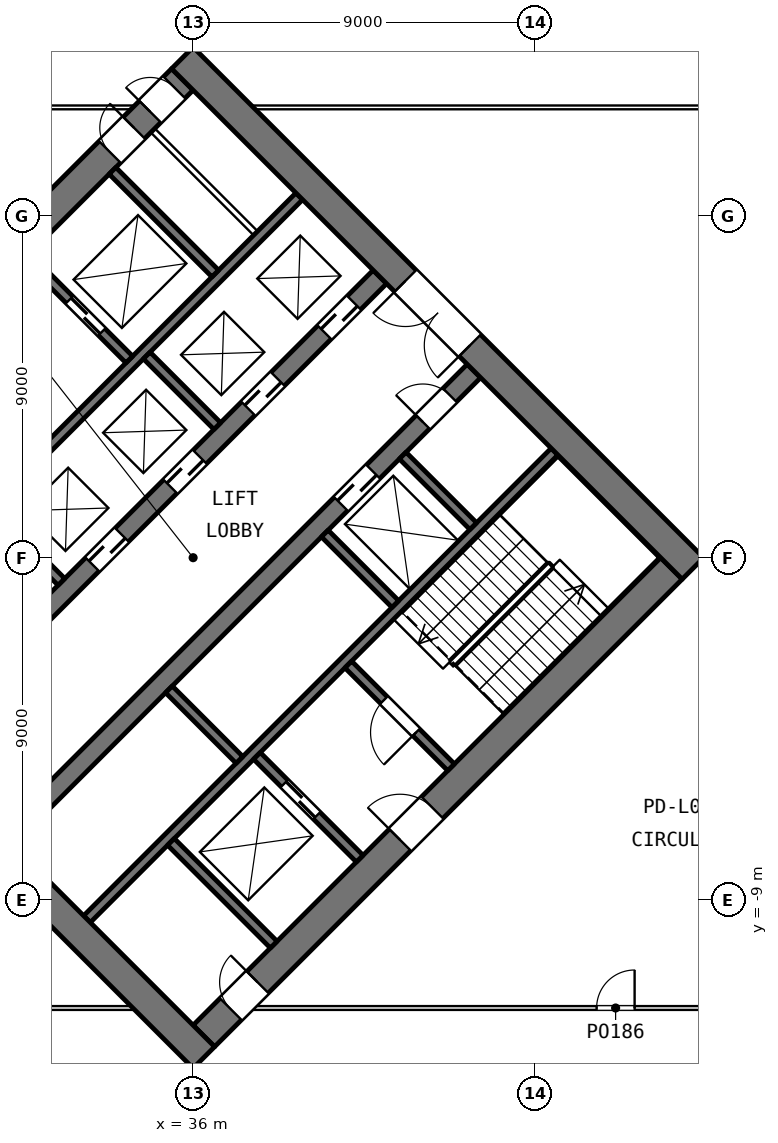
"""IFC4 building model, lengths in metres.
Left out: names, types, materials, properties, quantities, classifications, styles, units other than length and angle.
Written with IfcOpenShell. Run it as: python <this file> out.ifc"""

import sys

from ifc_helpers import new_model, si_unit, direction, frame, frame_2d, origin, place, context, subcontext, project, spatial, rectangle, extrude, element, fill, save


model = new_model("IFC4")
c1 = context("Model", 3, precision=1e-05, world=origin(), true_north=direction((0.0, 1.0)))
c2 = subcontext(c1, "Body", "Model", "MODEL_VIEW")
j1 = project(units=[si_unit("LENGTHUNIT", "METRE"), si_unit("PLANEANGLEUNIT", "RADIAN")], contexts=[c1])
p1 = place(None, origin())
s1 = spatial("IfcSite", under=j1, at=p1, CompositionType="ELEMENT")
p2 = place(p1, origin())
s2 = spatial("IfcBuilding", under=s1, at=p2, CompositionType="ELEMENT")
p3 = place(p2, frame((0.0, 0.0, 18.0)))
s3 = spatial("IfcBuildingStorey", under=s2, at=p3, CompositionType="ELEMENT", Elevation=18.0)
p4 = place(p3, frame((36.283, -12.586, 0.0), z_axis=(0.0, 0.0, 1.0), x_axis=(0.707106781187, 0.707106781187, 0.0)))
e1 = element("IfcWall", 1, at=p4, inside=s3, PredefinedType="SHEAR", context=c2, shape_type="SweptSolid", body=[
    extrude(rectangle(XDim=17.4, YDim=0.8, at=frame_2d((8.7, 0.0))), origin(), (0.0, 0.0, 1.0), 4.5),
])
p5 = place(p4, frame((7.3, 0.0, 0.0)))
e2 = element("IfcOpeningElement", 2, at=p5, cuts=e1, PredefinedType="OPENING", context=c2, shape_type="SweptSolid", body=[
    extrude(rectangle(XDim=1.2, YDim=2.1, at=frame_2d((0.6, 1.05))), frame((0.0, 0.41, 0.0), z_axis=(0.0, -1.0, 0.0), x_axis=(1.0, 0.0, 0.0)), (0.0, 0.0, 1.0), 0.82),
])
p6 = place(p4, frame((1.0, 0.0, 0.0)))
e3 = element("IfcOpeningElement", 3, at=p6, cuts=e1, PredefinedType="OPENING", context=c2, shape_type="SweptSolid", body=[
    extrude(rectangle(XDim=1.0, YDim=2.1, at=frame_2d((0.5, 1.05))), frame((0.0, 0.41, 0.0), z_axis=(0.0, -1.0, 0.0), x_axis=(1.0, 0.0, 0.0)), (0.0, 0.0, 1.0), 0.82),
])
p7 = place(p3, frame((33.207, -9.51, 0.0), z_axis=(0.0, 0.0, 1.0), x_axis=(0.707106781187, 0.707106781187, 0.0)))
e4 = element("IfcWall", 4, at=p7, inside=s3, PredefinedType="SHEAR", context=c2, shape_type="SweptSolid", body=[
    extrude(rectangle(XDim=17.4, YDim=0.25, at=frame_2d((8.7, 0.0))), origin(), (0.0, 0.0, 1.0), 4.5),
])
p8 = place(p3, frame((31.086, -7.389, 0.0), z_axis=(0.0, 0.0, 1.0), x_axis=(0.707106781187, 0.707106781187, 0.0)))
e5 = element("IfcWall", 5, at=p8, inside=s3, PredefinedType="SHEAR", context=c2, shape_type="SweptSolid", body=[
    extrude(rectangle(XDim=17.4, YDim=0.5, at=frame_2d((8.7, 0.0))), origin(), (0.0, 0.0, 1.0), 4.5),
])
p9 = place(p8, frame((12.45, 0.0, 0.0)))
e6 = element("IfcOpeningElement", 6, at=p9, cuts=e5, PredefinedType="OPENING", context=c2, shape_type="SweptSolid", body=[
    extrude(rectangle(XDim=1.2, YDim=2.1, at=frame_2d((0.6, 1.05))), frame((0.0, 0.26, 0.0), z_axis=(0.0, -1.0, 0.0), x_axis=(1.0, 0.0, 0.0)), (0.0, 0.0, 1.0), 0.52),
])
p10 = place(p8, frame((15.5, 0.0, 0.0)))
e7 = element("IfcOpeningElement", 7, at=p10, cuts=e5, PredefinedType="OPENING", context=c2, shape_type="SweptSolid", body=[
    extrude(rectangle(XDim=1.0, YDim=2.1, at=frame_2d((0.5, 1.05))), frame((0.0, 0.26, 0.0), z_axis=(0.0, -1.0, 0.0), x_axis=(1.0, 0.0, 0.0)), (0.0, 0.0, 1.0), 0.52),
])
p11 = place(p3, frame((28.611, -4.914, 0.0), z_axis=(0.0, 0.0, 1.0), x_axis=(0.707106781187, 0.707106781187, 0.0)))
e8 = element("IfcWall", 8, at=p11, inside=s3, PredefinedType="SHEAR", context=c2, shape_type="SweptSolid", body=[
    extrude(rectangle(XDim=17.4, YDim=0.5, at=frame_2d((8.7, 0.0))), origin(), (0.0, 0.0, 1.0), 4.5),
])
p12 = place(p11, frame((0.962, 0.0, 0.0)))
e9 = element("IfcOpeningElement", 9, at=p12, cuts=e8, PredefinedType="OPENING", context=c2, shape_type="SweptSolid", body=[
    extrude(rectangle(XDim=1.1, YDim=2.1, at=frame_2d((0.55, 1.05))), frame((0.0, 0.26, 0.0), z_axis=(0.0, -1.0, 0.0), x_axis=(1.0, 0.0, 0.0)), (0.0, 0.0, 1.0), 0.52),
])
p13 = place(p11, frame((3.8, 0.0, 0.0)))
e10 = element("IfcOpeningElement", 10, at=p13, cuts=e8, PredefinedType="OPENING", context=c2, shape_type="SweptSolid", body=[
    extrude(rectangle(XDim=1.1, YDim=2.1, at=frame_2d((0.55, 1.05))), frame((0.0, 0.26, 0.0), z_axis=(0.0, -1.0, 0.0), x_axis=(1.0, 0.0, 0.0)), (0.0, 0.0, 1.0), 0.52),
])
p14 = place(p11, frame((6.7, 0.0, 0.0)))
e11 = element("IfcOpeningElement", 11, at=p14, cuts=e8, PredefinedType="OPENING", context=c2, shape_type="SweptSolid", body=[
    extrude(rectangle(XDim=1.1, YDim=2.1, at=frame_2d((0.55, 1.05))), frame((0.0, 0.26, 0.0), z_axis=(0.0, -1.0, 0.0), x_axis=(1.0, 0.0, 0.0)), (0.0, 0.0, 1.0), 0.52),
])
p15 = place(p11, frame((9.6, 0.0, 0.0)))
e12 = element("IfcOpeningElement", 12, at=p15, cuts=e8, PredefinedType="OPENING", context=c2, shape_type="SweptSolid", body=[
    extrude(rectangle(XDim=1.1, YDim=2.1, at=frame_2d((0.55, 1.05))), frame((0.0, 0.26, 0.0), z_axis=(0.0, -1.0, 0.0), x_axis=(1.0, 0.0, 0.0)), (0.0, 0.0, 1.0), 0.52),
])
p16 = place(p11, frame((12.5, 0.0, 0.0)))
e13 = element("IfcOpeningElement", 13, at=p16, cuts=e8, PredefinedType="OPENING", context=c2, shape_type="SweptSolid", body=[
    extrude(rectangle(XDim=1.1, YDim=2.1, at=frame_2d((0.55, 1.05))), frame((0.0, 0.26, 0.0), z_axis=(0.0, -1.0, 0.0), x_axis=(1.0, 0.0, 0.0)), (0.0, 0.0, 1.0), 0.52),
])
p17 = place(p11, frame((15.337, 0.0, 0.0)))
e14 = element("IfcOpeningElement", 14, at=p17, cuts=e8, PredefinedType="OPENING", context=c2, shape_type="SweptSolid", body=[
    extrude(rectangle(XDim=1.1, YDim=2.1, at=frame_2d((0.55, 1.05))), frame((0.0, 0.26, 0.0), z_axis=(0.0, -1.0, 0.0), x_axis=(1.0, 0.0, 0.0)), (0.0, 0.0, 1.0), 0.52),
])
p18 = place(p3, frame((26.49, -2.793, 0.0), z_axis=(0.0, 0.0, 1.0), x_axis=(0.707106781187, 0.707106781187, 0.0)))
e15 = element("IfcWall", 15, at=p18, inside=s3, PredefinedType="SHEAR", context=c2, shape_type="SweptSolid", body=[
    extrude(rectangle(XDim=17.4, YDim=0.25, at=frame_2d((8.7, 0.0))), origin(), (0.0, 0.0, 1.0), 4.5),
])
p19 = place(p3, frame((23.414, 0.283, 0.0), z_axis=(0.0, 0.0, 1.0), x_axis=(0.707106781187, 0.707106781187, 0.0)))
e16 = element("IfcWall", 16, at=p19, inside=s3, PredefinedType="SHEAR", context=c2, shape_type="SweptSolid", body=[
    extrude(rectangle(XDim=17.4, YDim=0.8, at=frame_2d((8.7, 0.0))), origin(), (0.0, 0.0, 1.0), 4.5),
])
p20 = place(p19, frame((8.9, 0.0, 0.0)))
e17 = element("IfcOpeningElement", 17, at=p20, cuts=e16, PredefinedType="OPENING", context=c2, shape_type="SweptSolid", body=[
    extrude(rectangle(XDim=1.2, YDim=2.1, at=frame_2d((0.6, 1.05))), frame((0.0, 0.41, 0.0), z_axis=(0.0, -1.0, 0.0), x_axis=(1.0, 0.0, 0.0)), (0.0, 0.0, 1.0), 0.82),
])
p21 = place(p19, frame((14.7, 0.0, 0.0)))
e18 = element("IfcOpeningElement", 18, at=p21, cuts=e16, PredefinedType="OPENING", context=c2, shape_type="SweptSolid", body=[
    extrude(rectangle(XDim=0.9, YDim=2.1, at=frame_2d((0.45, 1.05))), frame((0.0, 0.41, 0.0), z_axis=(0.0, -1.0, 0.0), x_axis=(1.0, 0.0, 0.0)), (0.0, 0.0, 1.0), 0.82),
])
p22 = place(p19, frame((16.2, 0.0, 0.0)))
e19 = element("IfcOpeningElement", 19, at=p22, cuts=e16, PredefinedType="OPENING", context=c2, shape_type="SweptSolid", body=[
    extrude(rectangle(XDim=0.9, YDim=2.1, at=frame_2d((0.45, 1.05))), frame((0.0, 0.41, 0.0), z_axis=(0.0, -1.0, 0.0), x_axis=(1.0, 0.0, 0.0)), (0.0, 0.0, 1.0), 0.82),
])
p23 = place(p3, frame((36.283, -13.152, 0.0), z_axis=(0.0, 0.0, 1.0), x_axis=(-0.707106781187, 0.707106781187, 0.0)))
e20 = element("IfcWall", 20, at=p23, inside=s3, PredefinedType="SHEAR", context=c2, shape_type="SweptSolid", body=[
    extrude(rectangle(XDim=19.0, YDim=0.8, at=frame_2d((9.5, 0.0))), origin(), (0.0, 0.0, 1.0), 4.5),
])
p24 = place(p23, frame((8.3, 0.0, 0.0)))
e21 = element("IfcOpeningElement", 21, at=p24, cuts=e20, PredefinedType="OPENING", context=c2, shape_type="SweptSolid", body=[
    extrude(rectangle(XDim=2.4, YDim=2.1, at=frame_2d((1.2, 1.05))), frame((0.0, 0.41, 0.0), z_axis=(0.0, -1.0, 0.0), x_axis=(1.0, 0.0, 0.0)), (0.0, 0.0, 1.0), 0.82),
])
p25 = place(p3, frame((38.121, -10.182, 0.0), z_axis=(0.0, 0.0, 1.0), x_axis=(-0.707138693938, 0.707074866995, 0.0)))
e22 = element("IfcWall", 22, at=p25, inside=s3, PredefinedType="SHEAR", context=c2, shape_type="SweptSolid", body=[
    extrude(rectangle(XDim=3.825, YDim=0.25, at=frame_2d((1.913, 0.0))), origin(), (0.0, 0.0, 1.0), 4.5),
])
for number, where, z_axis, x_axis in (
    (23, (37.22, -5.321, 0.0), (0.0, 0.0, 1.0), (-0.707, 0.707, 0.0)),
    (24, (32.535, -0.636, 0.0), (0.0, 0.0, 1.0), (-0.707, 0.707, 0.0)),
):
    element("IfcWall", number, at=place(p3, frame(where, z_axis=z_axis, x_axis=x_axis)), inside=s3, PredefinedType="SHEAR", context=c2, shape_type="SweptSolid", body=[
        extrude(rectangle(XDim=2.625, YDim=0.25, at=frame_2d((1.312, 0.0))), origin(), (0.0, 0.0, 1.0), 4.5),
    ])
p26 = place(p3, frame((40.384, -7.92, 0.0), z_axis=(0.0, 0.0, 1.0), x_axis=(-0.707074866995, 0.707138693938, 0.0)))
e25 = element("IfcWall", 25, at=p26, inside=s3, PredefinedType="SHEAR", context=c2, shape_type="SweptSolid", body=[
    extrude(rectangle(XDim=3.825, YDim=0.25, at=frame_2d((1.913, 0.0))), origin(), (0.0, 0.0, 1.0), 4.5),
])
p27 = place(p26, frame((1.6, 0.0, 0.0)))
e26 = element("IfcOpeningElement", 26, at=p27, cuts=e25, PredefinedType="OPENING", context=c2, shape_type="SweptSolid", body=[
    extrude(rectangle(XDim=1.2, YDim=2.1, at=frame_2d((0.6, 1.05))), frame((0.0, 0.135, 0.0), z_axis=(0.0, -1.0, 0.0), x_axis=(1.0, 0.0, 0.0)), (0.0, 0.0, 1.0), 0.27),
])
p28 = place(p3, frame((42.788, -5.515, 0.0), z_axis=(0.0, 0.0, 1.0), x_axis=(-0.707106781187, 0.707106781187, 0.0)))
e27 = element("IfcWall", 27, at=p28, inside=s3, PredefinedType="SHEAR", context=c2, shape_type="SweptSolid", body=[
    extrude(rectangle(XDim=3.825, YDim=0.25, at=frame_2d((1.913, 0.0))), origin(), (0.0, 0.0, 1.0), 4.5),
])
p29 = place(p28, frame((1.3, 0.0, 0.0)))
e28 = element("IfcOpeningElement", 28, at=p29, cuts=e27, PredefinedType="OPENING", context=c2, shape_type="SweptSolid", body=[
    extrude(rectangle(XDim=1.2, YDim=2.1, at=frame_2d((0.6, 1.05))), frame((0.0, 0.135, 0.0), z_axis=(0.0, -1.0, 0.0), x_axis=(1.0, 0.0, 0.0)), (0.0, 0.0, 1.0), 0.27),
])
p30 = place(p3, frame((34.321, 5.215, 0.0), z_axis=(0.0, 0.0, 1.0), x_axis=(-0.707074866995, 0.707138693938, 0.0)))
e29 = element("IfcWall", 29, at=p30, inside=s3, PredefinedType="SHEAR", context=c2, shape_type="SweptSolid", body=[
    extrude(rectangle(XDim=3.825, YDim=0.25, at=frame_2d((1.913, 0.0))), origin(), (0.0, 0.0, 1.0), 4.5),
])
p31 = place(p30, frame((1.025, 0.0, 0.0)))
e30 = element("IfcOpeningElement", 30, at=p31, cuts=e29, PredefinedType="OPENING", context=c2, shape_type="SweptSolid", body=[
    extrude(rectangle(XDim=1.2, YDim=2.1, at=frame_2d((0.6, 1.05))), frame((0.0, 0.135, 0.0), z_axis=(0.0, -1.0, 0.0), x_axis=(1.0, 0.0, 0.0)), (0.0, 0.0, 1.0), 0.27),
])
for number, where, z_axis, x_axis in (
    (31, (41.321, -1.22, 0.0), (0.0, 0.0, 1.0), (-0.707, 0.707, 0.0)),
    (32, (36.636, 3.465, 0.0), (0.0, 0.0, 1.0), (-0.707, 0.707, 0.0)),
):
    element("IfcWall", number, at=place(p3, frame(where, z_axis=z_axis, x_axis=x_axis)), inside=s3, PredefinedType="SHEAR", context=c2, shape_type="SweptSolid", body=[
        extrude(rectangle(XDim=2.625, YDim=0.25, at=frame_2d((1.312, 0.0))), origin(), (0.0, 0.0, 1.0), 4.5),
    ])
p32 = place(p3, frame((36.583, 7.478, 0.0), z_axis=(0.0, 0.0, 1.0), x_axis=(-0.707138693938, 0.707074866995, 0.0)))
e33 = element("IfcWall", 33, at=p32, inside=s3, PredefinedType="SHEAR", context=c2, shape_type="SweptSolid", body=[
    extrude(rectangle(XDim=3.825, YDim=0.25, at=frame_2d((1.913, 0.0))), origin(), (0.0, 0.0, 1.0), 4.5),
])
p33 = place(p3, frame((43.372, 0.831, 0.0), z_axis=(0.0, 0.0, 1.0), x_axis=(-0.707106781187, 0.707106781187, 0.0)))
e34 = element("IfcWall", 34, at=p33, inside=s3, PredefinedType="SHEAR", context=c2, shape_type="SweptSolid", body=[
    extrude(rectangle(XDim=2.625, YDim=0.25, at=frame_2d((1.312, 0.0))), origin(), (0.0, 0.0, 1.0), 4.5),
])
p34 = place(p3, frame((37.644, 8.538, 0.0), z_axis=(0.0, 0.0, 1.0), x_axis=(-0.707138693938, 0.707074866995, 0.0)))
e35 = element("IfcWall", 35, at=p34, inside=s3, PredefinedType="PARTITIONING", context=c2, shape_type="SweptSolid", body=[
    extrude(rectangle(XDim=3.825, YDim=0.15, at=frame_2d((1.913, 0.0))), origin(), (0.0, 0.0, 1.0), 4.5),
])
p35 = place(p3, frame((49.152, -0.283, 0.0), z_axis=(0.0, 0.0, 1.0), x_axis=(-0.707106781187, 0.707106781187, 0.0)))
e36 = element("IfcWall", 36, at=p35, inside=s3, PredefinedType="SHEAR", context=c2, shape_type="SweptSolid", body=[
    extrude(rectangle(XDim=19.0, YDim=0.8, at=frame_2d((9.5, 0.0))), origin(), (0.0, 0.0, 1.0), 4.5),
])
p36 = place(p35, frame((8.3, 0.0, 0.0)))
e37 = element("IfcOpeningElement", 37, at=p36, cuts=e36, PredefinedType="OPENING", context=c2, shape_type="SweptSolid", body=[
    extrude(rectangle(XDim=2.4, YDim=2.1, at=frame_2d((1.2, 1.05))), frame((0.0, 0.41, 0.0), z_axis=(0.0, -1.0, 0.0), x_axis=(1.0, 0.0, 0.0)), (0.0, 0.0, 1.0), 0.82),
])
p37 = place(p3, frame((20.1, 11.85, 0.0), z_axis=(0.0, 0.0, 1.0), x_axis=(1.0, 0.0, 0.0)))
e38 = element("IfcWall", 38, at=p37, inside=s3, PredefinedType="PARTITIONING", context=c2, shape_type="SweptSolid", body=[
    extrude(rectangle(XDim=14.315, YDim=0.1, at=frame_2d((7.157, 0.0))), origin(), (0.0, 0.0, 1.0), 4.5),
])
p38 = place(p3, frame((37.585, 11.85, 0.0), z_axis=(0.0, 0.0, 1.0), x_axis=(1.0, 0.0, 0.0)))
e39 = element("IfcWall", 39, at=p38, inside=s3, PredefinedType="PARTITIONING", context=c2, shape_type="SweptSolid", body=[
    extrude(rectangle(XDim=27.015, YDim=0.1, at=frame_2d((13.508, 0.0))), origin(), (0.0, 0.0, 1.0), 4.5),
])
p39 = place(p38, frame((12.607, 0.0, 0.0)))
e40 = element("IfcOpeningElement", 40, at=p39, cuts=e39, PredefinedType="OPENING", context=c2, shape_type="SweptSolid", body=[
    extrude(rectangle(XDim=1.8, YDim=2.1, at=frame_2d((0.9, 1.05))), frame((0.0, 0.06, 0.0), z_axis=(0.0, -1.0, 0.0), x_axis=(1.0, 0.0, 0.0)), (0.0, 0.0, 1.0), 0.12),
])
p40 = place(p3, frame((13.0, -11.85, 0.0), z_axis=(0.0, 0.0, 1.0), x_axis=(1.0, 0.0, 0.0)))
e41 = element("IfcWall", 41, at=p40, inside=s3, PredefinedType="PARTITIONING", context=c2, shape_type="SweptSolid", body=[
    extrude(rectangle(XDim=21.415, YDim=0.1, at=frame_2d((10.708, 0.0))), origin(), (0.0, 0.0, 1.0), 4.5),
])
p41 = place(p3, frame((37.585, -11.85, 0.0), z_axis=(0.0, 0.0, 1.0), x_axis=(1.0, 0.0, 0.0)))
e42 = element("IfcWall", 42, at=p41, inside=s3, PredefinedType="PARTITIONING", context=c2, shape_type="SweptSolid", body=[
    extrude(rectangle(XDim=19.065, YDim=0.1, at=frame_2d((9.532, 0.0))), origin(), (0.0, 0.0, 1.0), 4.5),
])
p42 = place(p41, frame((9.032, 0.0, 0.0)))
e43 = element("IfcOpeningElement", 43, at=p42, cuts=e42, PredefinedType="OPENING", context=c2, shape_type="SweptSolid", body=[
    extrude(rectangle(XDim=1.0, YDim=2.1, at=frame_2d((0.5, 1.05))), frame((0.0, 0.06, 0.0), z_axis=(0.0, -1.0, 0.0), x_axis=(1.0, 0.0, 0.0)), (0.0, 0.0, 1.0), 0.12),
])
p43 = place(p36, origin())
e44 = element("IfcDoor", 44, at=p43, inside=s3, OperationType="DOUBLE_DOOR_SINGLE_SWING", PredefinedType="DOOR", context=c2, shape_type="SweptSolid", body=[
    extrude(rectangle(XDim=2.4, YDim=2.1, at=frame_2d((1.2, 1.05))), frame((0.0, 0.275, 0.0), z_axis=(0.0, -1.0, 0.0), x_axis=(1.0, 0.0, 0.0)), (0.0, 0.0, 1.0), 0.05),
])
fill(e37, e44)
p44 = place(p14, origin())
e45 = element("IfcDoor", 45, at=p44, inside=s3, OperationType="SLIDING_TO_LEFT", PredefinedType="DOOR", context=c2, shape_type="SweptSolid", body=[
    extrude(rectangle(XDim=1.1, YDim=2.1, at=frame_2d((0.55, 1.05))), frame((0.0, 0.025, 0.0), z_axis=(0.0, -1.0, 0.0), x_axis=(1.0, 0.0, 0.0)), (0.0, 0.0, 1.0), 0.05),
])
fill(e11, e45)
p45 = place(p15, origin())
e46 = element("IfcDoor", 46, at=p45, inside=s3, OperationType="SLIDING_TO_LEFT", PredefinedType="DOOR", context=c2, shape_type="SweptSolid", body=[
    extrude(rectangle(XDim=1.1, YDim=2.1, at=frame_2d((0.55, 1.05))), frame((0.0, 0.025, 0.0), z_axis=(0.0, -1.0, 0.0), x_axis=(1.0, 0.0, 0.0)), (0.0, 0.0, 1.0), 0.05),
])
fill(e12, e46)
p46 = place(p16, origin())
e47 = element("IfcDoor", 47, at=p46, inside=s3, OperationType="SLIDING_TO_LEFT", PredefinedType="DOOR", context=c2, shape_type="SweptSolid", body=[
    extrude(rectangle(XDim=1.1, YDim=2.1, at=frame_2d((0.55, 1.05))), frame((0.0, 0.025, 0.0), z_axis=(0.0, -1.0, 0.0), x_axis=(1.0, 0.0, 0.0)), (0.0, 0.0, 1.0), 0.05),
])
fill(e13, e47)
p47 = place(p17, origin())
e48 = element("IfcDoor", 48, at=p47, inside=s3, OperationType="SLIDING_TO_LEFT", PredefinedType="DOOR", context=c2, shape_type="SweptSolid", body=[
    extrude(rectangle(XDim=1.1, YDim=2.1, at=frame_2d((0.55, 1.05))), frame((0.0, 0.025, 0.0), z_axis=(0.0, -1.0, 0.0), x_axis=(1.0, 0.0, 0.0)), (0.0, 0.0, 1.0), 0.05),
])
fill(e14, e48)
p48 = place(p9, origin())
e49 = element("IfcDoor", 49, at=p48, inside=s3, OperationType="SLIDING_TO_LEFT", PredefinedType="DOOR", context=c2, shape_type="SweptSolid", body=[
    extrude(rectangle(XDim=1.2, YDim=2.1, at=frame_2d((0.6, 1.05))), frame((0.0, 0.025, 0.0), z_axis=(0.0, -1.0, 0.0), x_axis=(1.0, 0.0, 0.0)), (0.0, 0.0, 1.0), 0.05),
])
fill(e6, e49)
p49 = place(p31, origin())
e50 = element("IfcDoor", 50, at=p49, inside=s3, OperationType="SLIDING_TO_LEFT", PredefinedType="DOOR", context=c2, shape_type="SweptSolid", body=[
    extrude(rectangle(XDim=1.2, YDim=2.1, at=frame_2d((0.6, 1.05))), frame((0.0, 0.025, 0.0), z_axis=(0.0, -1.0, 0.0), x_axis=(1.0, 0.0, 0.0)), (0.0, 0.0, 1.0), 0.05),
])
fill(e30, e50)
p50 = place(p27, origin())
e51 = element("IfcDoor", 51, at=p50, inside=s3, OperationType="SLIDING_TO_LEFT", PredefinedType="DOOR", context=c2, shape_type="SweptSolid", body=[
    extrude(rectangle(XDim=1.2, YDim=2.1, at=frame_2d((0.6, 1.05))), frame((0.0, 0.025, 0.0), z_axis=(0.0, -1.0, 0.0), x_axis=(1.0, 0.0, 0.0)), (0.0, 0.0, 1.0), 0.05),
])
fill(e26, e51)
p51 = place(p10, origin())
e52 = element("IfcDoor", 52, at=p51, inside=s3, OperationType="SINGLE_SWING_LEFT", PredefinedType="DOOR", context=c2, shape_type="SweptSolid", body=[
    extrude(rectangle(XDim=1.0, YDim=2.1, at=frame_2d((0.5, 1.05))), frame((0.0, 0.025, 0.0), z_axis=(0.0, -1.0, 0.0), x_axis=(1.0, 0.0, 0.0)), (0.0, 0.0, 1.0), 0.05),
])
fill(e7, e52)
p52 = place(p29, origin())
e53 = element("IfcDoor", 53, at=p52, inside=s3, OperationType="SINGLE_SWING_LEFT", PredefinedType="DOOR", context=c2, shape_type="SweptSolid", body=[
    extrude(rectangle(XDim=1.2, YDim=2.1, at=frame_2d((0.6, 1.05))), frame((0.0, 0.025, 0.0), z_axis=(0.0, -1.0, 0.0), x_axis=(1.0, 0.0, 0.0)), (0.0, 0.0, 1.0), 0.05),
])
fill(e28, e53)
p53 = place(p5, origin())
e54 = element("IfcDoor", 54, at=p53, inside=s3, OperationType="SINGLE_SWING_LEFT", PredefinedType="DOOR", context=c2, shape_type="SweptSolid", body=[
    extrude(rectangle(XDim=1.2, YDim=2.1, at=frame_2d((0.6, 1.05))), frame((0.0, 0.275, 0.0), z_axis=(0.0, -1.0, 0.0), x_axis=(1.0, 0.0, 0.0)), (0.0, 0.0, 1.0), 0.05),
])
fill(e2, e54)
p54 = place(p21, origin())
e55 = element("IfcDoor", 55, at=p54, inside=s3, OperationType="SINGLE_SWING_RIGHT", PredefinedType="DOOR", context=c2, shape_type="SweptSolid", body=[
    extrude(rectangle(XDim=0.9, YDim=2.1, at=frame_2d((0.45, 1.05))), frame((0.0, -0.225, 0.0), z_axis=(0.0, -1.0, 0.0), x_axis=(1.0, 0.0, 0.0)), (0.0, 0.0, 1.0), 0.05),
])
fill(e18, e55)
p55 = place(p22, origin())
e56 = element("IfcDoor", 56, at=p55, inside=s3, OperationType="SINGLE_SWING_LEFT", PredefinedType="DOOR", context=c2, shape_type="SweptSolid", body=[
    extrude(rectangle(XDim=0.9, YDim=2.1, at=frame_2d((0.45, 1.05))), frame((0.0, -0.225, 0.0), z_axis=(0.0, -1.0, 0.0), x_axis=(1.0, 0.0, 0.0)), (0.0, 0.0, 1.0), 0.05),
])
fill(e19, e56)
p56 = place(p6, origin())
e57 = element("IfcDoor", 57, at=p56, inside=s3, OperationType="SINGLE_SWING_RIGHT", PredefinedType="DOOR", context=c2, shape_type="SweptSolid", body=[
    extrude(rectangle(XDim=1.0, YDim=2.1, at=frame_2d((0.5, 1.05))), frame((0.0, 0.275, 0.0), z_axis=(0.0, -1.0, 0.0), x_axis=(1.0, 0.0, 0.0)), (0.0, 0.0, 1.0), 0.05),
])
fill(e3, e57)
p57 = place(p42, origin())
e58 = element("IfcDoor", 58, at=p57, inside=s3, OperationType="SINGLE_SWING_RIGHT", PredefinedType="DOOR", context=c2, shape_type="SweptSolid", body=[
    extrude(rectangle(XDim=1.0, YDim=2.1, at=frame_2d((0.5, 1.05))), frame((0.0, 0.025, 0.0), z_axis=(0.0, -1.0, 0.0), x_axis=(1.0, 0.0, 0.0)), (0.0, 0.0, 1.0), 0.05),
])
fill(e43, e58)
save(model, sys.argv[1])
